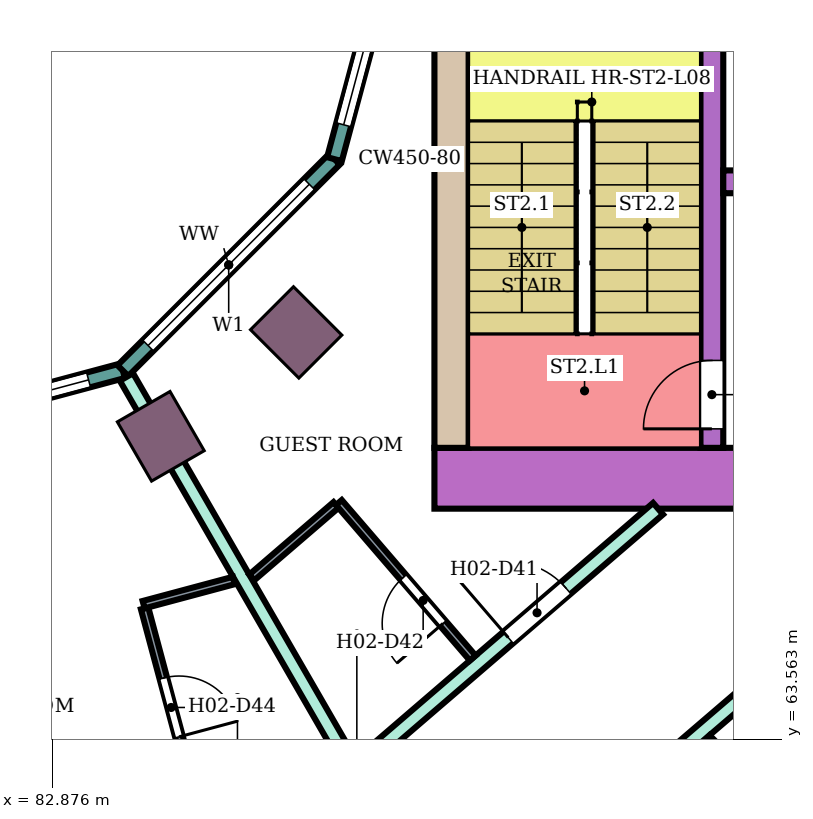
"""IFC4 building model, lengths in metres.
Left out: names, types, materials, properties, quantities, classifications, styles, units other than length and angle.
Written with IfcOpenShell. Run it as: python <this file> out.ifc"""

import sys

from ifc_helpers import new_model, si_unit, direction, frame, frame_2d, origin, origin_2d, place, context, subcontext, project, spatial, rectangle, extrude, element, fill, save


model = new_model("IFC4")
c1 = context("Model", 3, precision=1e-05, world=origin(), true_north=direction((0.0, 1.0)))
c2 = subcontext(c1, "Body", "Model", "MODEL_VIEW")
j1 = project(units=[si_unit("LENGTHUNIT", "METRE"), si_unit("PLANEANGLEUNIT", "RADIAN")], contexts=[c1])
p1 = place(None, origin())
s1 = spatial("IfcSite", under=j1, at=p1, CompositionType="ELEMENT")
p2 = place(p1, origin())
s2 = spatial("IfcBuilding", under=s1, at=p2, CompositionType="ELEMENT")
p3 = place(p2, frame((0.0, 0.0, 40.2)))
s3 = spatial("IfcBuildingStorey", under=s2, at=p3, CompositionType="ELEMENT", Elevation=40.2)
for number, where, z_axis, x_axis in (
    (1, (84.3, 67.552, 0.0), (0.0, 0.0, 1.0), (0.5, -0.866, 0.0)),
    (2, (86.081, 68.919, 0.0), (0.0, 0.0, 1.0), (0.707, -0.707, 0.0)),
):
    element("IfcColumn", number, at=place(p3, frame(where, z_axis=z_axis, x_axis=x_axis)), inside=s3, PredefinedType="COLUMN", context=c2, shape_type="SweptSolid", body=[
        extrude(rectangle(XDim=0.9, YDim=0.8, at=origin_2d()), origin(), (0.0, 0.0, 1.0), 3.8),
    ])
p4 = place(p3, frame((87.9, 67.0, 0.0), z_axis=(0.0, 0.0, 1.0), x_axis=(1.0, 0.0, 0.0)))
e3 = element("IfcWall", 3, at=p4, inside=s3, PredefinedType="SHEAR", context=c2, shape_type="SweptSolid", body=[
    extrude(rectangle(XDim=14.7, YDim=0.8, at=frame_2d((7.35, 0.0))), origin(), (0.0, 0.0, 1.0), 3.48),
])
p5 = place(p4, frame((4.2, 0.0, 0.0)))
e4 = element("IfcOpeningElement", 4, at=p5, cuts=e3, PredefinedType="OPENING", context=c2, shape_type="SweptSolid", body=[
    extrude(rectangle(XDim=2.4, YDim=2.4, at=frame_2d((1.2, 1.2))), frame((0.0, 0.41, 0.0), z_axis=(0.0, -1.0, 0.0), x_axis=(1.0, 0.0, 0.0)), (0.0, 0.0, 1.0), 0.82),
])
p6 = place(p3, frame((88.125, 67.4, 0.0), z_axis=(0.0, 0.0, 1.0), x_axis=(0.0, 1.0, 0.0)))
e5 = element("IfcWall", 5, at=p6, inside=s3, PredefinedType="SHEAR", context=c2, shape_type="SweptSolid", body=[
    extrude(rectangle(XDim=7.6, YDim=0.45, at=frame_2d((3.8, 0.0))), origin(), (0.0, 0.0, 1.0), 3.48),
])
p7 = place(p3, frame((91.55, 67.4, 0.0), z_axis=(0.0, 0.0, 1.0), x_axis=(0.0, 1.0, 0.0)))
e6 = element("IfcWall", 6, at=p7, inside=s3, PredefinedType="SHEAR", context=c2, shape_type="SweptSolid", body=[
    extrude(rectangle(XDim=7.6, YDim=0.3, at=frame_2d((3.8, 0.0))), origin(), (0.0, 0.0, 1.0), 3.48),
])
p8 = place(p7, frame((0.25, 0.0, 0.0)))
e7 = element("IfcOpeningElement", 7, at=p8, cuts=e6, PredefinedType="OPENING", context=c2, shape_type="SweptSolid", body=[
    extrude(rectangle(XDim=0.9, YDim=2.1, at=frame_2d((0.45, 1.05))), frame((0.0, 0.16, 0.0), z_axis=(0.0, -1.0, 0.0), x_axis=(1.0, 0.0, 0.0)), (0.0, 0.0, 1.0), 0.32),
])
p9 = place(p3, frame((91.7, 70.9, 0.0), z_axis=(0.0, 0.0, 1.0), x_axis=(1.0, 0.0, 0.0)))
e8 = element("IfcWall", 8, at=p9, inside=s3, PredefinedType="SHEAR", context=c2, shape_type="SweptSolid", body=[
    extrude(rectangle(XDim=10.9, YDim=0.3, at=frame_2d((5.45, 0.0))), origin(), (0.0, 0.0, 1.0), 3.48),
])
p10 = place(p9, frame((0.4, 0.0, 0.0)))
e9 = element("IfcOpeningElement", 9, at=p10, cuts=e8, PredefinedType="OPENING", context=c2, shape_type="SweptSolid", body=[
    extrude(rectangle(XDim=1.4, YDim=2.1, at=frame_2d((0.7, 1.05))), frame((0.0, 0.16, 0.0), z_axis=(0.0, -1.0, 0.0), x_axis=(1.0, 0.0, 0.0)), (0.0, 0.0, 1.0), 0.32),
])
p11 = place(p9, frame((5.4, 0.0, 0.0)))
e10 = element("IfcOpeningElement", 10, at=p11, cuts=e8, PredefinedType="OPENING", context=c2, shape_type="SweptSolid", body=[
    extrude(rectangle(XDim=1.4, YDim=2.1, at=frame_2d((0.7, 1.05))), frame((0.0, 0.16, 0.0), z_axis=(0.0, -1.0, 0.0), x_axis=(1.0, 0.0, 0.0)), (0.0, 0.0, 1.0), 0.32),
])
p12 = place(p9, frame((8.1, 0.0, 0.0)))
e11 = element("IfcOpeningElement", 11, at=p12, cuts=e8, PredefinedType="OPENING", context=c2, shape_type="SweptSolid", body=[
    extrude(rectangle(XDim=1.0, YDim=2.1, at=frame_2d((0.5, 1.05))), frame((0.0, 0.16, 0.0), z_axis=(0.0, -1.0, 0.0), x_axis=(1.0, 0.0, 0.0)), (0.0, 0.0, 1.0), 0.32),
])
p13 = place(p3, frame((80.0, 67.396, 0.0), z_axis=(0.0, 0.0, 1.0), x_axis=(0.965933654434, 0.258789828301, 0.0)))
e12 = element("IfcWall", 12, at=p13, inside=s3, PredefinedType="NOTDEFINED", context=c2, shape_type="SweptSolid", body=[
    extrude(rectangle(XDim=3.936, YDim=0.2, at=frame_2d((1.968, 0.0))), origin(), (0.0, 0.0, 1.0), 3.8),
])
p14 = place(p13, frame((0.468, 0.0, 0.9)))
e13 = element("IfcOpeningElement", 13, at=p14, cuts=e12, PredefinedType="OPENING", context=c2, shape_type="SweptSolid", body=[
    extrude(rectangle(XDim=3.0, YDim=2.3, at=frame_2d((1.5, 1.15))), frame((0.0, 0.11, 0.0), z_axis=(0.0, -1.0, 0.0), x_axis=(1.0, 0.0, 0.0)), (0.0, 0.0, 1.0), 0.22),
])
p15 = place(p3, frame((83.802, 68.415, 0.0), z_axis=(0.0, 0.0, 1.0), x_axis=(0.707106781187, 0.707106781187, 0.0)))
e14 = element("IfcWall", 14, at=p15, inside=s3, PredefinedType="NOTDEFINED", context=c2, shape_type="SweptSolid", body=[
    extrude(rectangle(XDim=3.936, YDim=0.2, at=frame_2d((1.968, 0.0))), origin(), (0.0, 0.0, 1.0), 3.8),
])
p16 = place(p15, frame((0.468, 0.0, 0.9)))
e15 = element("IfcOpeningElement", 15, at=p16, cuts=e14, PredefinedType="OPENING", context=c2, shape_type="SweptSolid", body=[
    extrude(rectangle(XDim=3.0, YDim=2.3, at=frame_2d((1.5, 1.15))), frame((0.0, 0.11, 0.0), z_axis=(0.0, -1.0, 0.0), x_axis=(1.0, 0.0, 0.0)), (0.0, 0.0, 1.0), 0.22),
])
p17 = place(p3, frame((86.585, 71.198, 0.0), z_axis=(0.0, 0.0, 1.0), x_axis=(0.258789828301, 0.965933654434, 0.0)))
e16 = element("IfcWall", 16, at=p17, inside=s3, PredefinedType="NOTDEFINED", context=c2, shape_type="SweptSolid", body=[
    extrude(rectangle(XDim=3.936, YDim=0.2, at=frame_2d((1.968, 0.0))), origin(), (0.0, 0.0, 1.0), 3.8),
])
p18 = place(p17, frame((0.468, 0.0, 0.9)))
e17 = element("IfcOpeningElement", 17, at=p18, cuts=e16, PredefinedType="OPENING", context=c2, shape_type="SweptSolid", body=[
    extrude(rectangle(XDim=3.0, YDim=2.3, at=frame_2d((1.5, 1.15))), frame((0.0, 0.11, 0.0), z_axis=(0.0, -1.0, 0.0), x_axis=(1.0, 0.0, 0.0)), (0.0, 0.0, 1.0), 0.22),
])
p19 = place(p3, frame((83.848, 68.332, 0.0), z_axis=(0.0, 0.0, 1.0), x_axis=(0.499919778085, -0.866071714975, 0.0)))
e18 = element("IfcWall", 18, at=p19, inside=s3, PredefinedType="PARTITIONING", context=c2, shape_type="SweptSolid", body=[
    extrude(rectangle(XDim=5.855, YDim=0.2, at=frame_2d((2.927, 0.0))), origin(), (0.0, 0.0, 1.0), 3.35),
])
p20 = place(p3, frame((86.877, 63.189, 0.0), z_axis=(0.0, 0.0, 1.0), x_axis=(0.758164888471, 0.652062881853, 0.0)))
e19 = element("IfcWall", 19, at=p20, inside=s3, PredefinedType="PARTITIONING", context=c2, shape_type="SweptSolid", body=[
    extrude(rectangle(XDim=5.23, YDim=0.2, at=frame_2d((2.615, 0.0))), origin(), (0.0, 0.0, 1.0), 3.35),
])
p21 = place(p20, frame((2.63, 0.0, 0.0)))
e20 = element("IfcOpeningElement", 20, at=p21, cuts=e19, PredefinedType="OPENING", context=c2, shape_type="SweptSolid", body=[
    extrude(rectangle(XDim=1.0, YDim=2.1, at=frame_2d((0.5, 1.05))), frame((0.0, 0.11, 0.0), z_axis=(0.0, -1.0, 0.0), x_axis=(1.0, 0.0, 0.0)), (0.0, 0.0, 1.0), 0.22),
])
p22 = place(p3, frame((88.235, 60.931, 0.0), z_axis=(0.0, 0.0, 1.0), x_axis=(0.758799498714, 0.651324282329, 0.0)))
e21 = element("IfcWall", 21, at=p22, inside=s3, PredefinedType="PARTITIONING", context=c2, shape_type="SweptSolid", body=[
    extrude(rectangle(XDim=6.186, YDim=0.2, at=frame_2d((3.093, 0.0))), origin(), (0.0, 0.0, 1.0), 3.35),
])
p23 = place(p22, frame((1.519, 0.0, 0.0)))
e22 = element("IfcOpeningElement", 22, at=p23, cuts=e21, PredefinedType="OPENING", context=c2, shape_type="SweptSolid", body=[
    extrude(rectangle(XDim=1.0, YDim=2.1, at=frame_2d((0.5, 1.05))), frame((0.0, 0.11, 0.0), z_axis=(0.0, -1.0, 0.0), x_axis=(1.0, 0.0, 0.0)), (0.0, 0.0, 1.0), 0.22),
])
p24 = place(p3, frame((91.449, 63.548, 0.0), z_axis=(0.0, 0.0, 1.0), x_axis=(0.706984810649, -0.707228730688, 0.0)))
e23 = element("IfcWall", 23, at=p24, inside=s3, PredefinedType="PARTITIONING", context=c2, shape_type="SweptSolid", body=[
    extrude(rectangle(XDim=7.006, YDim=0.2, at=frame_2d((3.503, 0.0))), origin(), (0.0, 0.0, 1.0), 3.35),
])
p25 = place(p3, frame((84.087, 65.289, 0.0), z_axis=(0.0, 0.0, 1.0), x_axis=(0.258929459649, -0.965896234037, 0.0)))
e24 = element("IfcWall", 24, at=p25, inside=s3, PredefinedType="PARTITIONING", context=c2, shape_type="SweptSolid", body=[
    extrude(rectangle(XDim=2.65, YDim=0.1, at=frame_2d((1.325, 0.0))), origin(), (0.0, 0.0, 1.0), 3.35),
])
p26 = place(p25, frame((0.95, 0.0, 0.0)))
e25 = element("IfcOpeningElement", 25, at=p26, cuts=e24, PredefinedType="OPENING", context=c2, shape_type="SweptSolid", body=[
    extrude(rectangle(XDim=0.8, YDim=2.1, at=frame_2d((0.4, 1.05))), frame((0.0, 0.06, 0.0), z_axis=(0.0, -1.0, 0.0), x_axis=(1.0, 0.0, 0.0)), (0.0, 0.0, 1.0), 0.12),
])
p27 = place(p3, frame((84.074, 65.337, 0.0), z_axis=(0.0, 0.0, 1.0), x_axis=(0.965914351064, 0.258861867428, 0.0)))
e26 = element("IfcWall", 26, at=p27, inside=s3, PredefinedType="PARTITIONING", context=c2, shape_type="SweptSolid", body=[
    extrude(rectangle(XDim=1.229, YDim=0.1, at=frame_2d((0.615, 0.0))), origin(), (0.0, 0.0, 1.0), 3.35),
])
p28 = place(p3, frame((85.497, 65.696, 0.0), z_axis=(0.0, 0.0, 1.0), x_axis=(0.75817032582, 0.652056559698, 0.0)))
e27 = element("IfcWall", 27, at=p28, inside=s3, PredefinedType="PARTITIONING", context=c2, shape_type="SweptSolid", body=[
    extrude(rectangle(XDim=1.461, YDim=0.1, at=frame_2d((0.73, 0.0))), origin(), (0.0, 0.0, 1.0), 3.35),
])
p29 = place(p3, frame((86.643, 66.681, 0.0), z_axis=(0.0, 0.0, 1.0), x_axis=(0.652264876065, -0.757991115682, 0.0)))
e28 = element("IfcWall", 28, at=p29, inside=s3, PredefinedType="PARTITIONING", context=c2, shape_type="SweptSolid", body=[
    extrude(rectangle(XDim=2.699, YDim=0.1, at=frame_2d((1.35, 0.0))), origin(), (0.0, 0.0, 1.0), 3.35),
])
p30 = place(p29, frame((1.3, 0.0, 0.0)))
e29 = element("IfcOpeningElement", 29, at=p30, cuts=e28, PredefinedType="OPENING", context=c2, shape_type="SweptSolid", body=[
    extrude(rectangle(XDim=0.8, YDim=2.1, at=frame_2d((0.4, 1.05))), frame((0.0, 0.06, 0.0), z_axis=(0.0, -1.0, 0.0), x_axis=(1.0, 0.0, 0.0)), (0.0, 0.0, 1.0), 0.12),
])
p31 = place(p14, origin())
e30 = element("IfcWindow", 30, at=p31, inside=s3, PartitioningType="SINGLE_PANEL", PredefinedType="WINDOW", context=c2, shape_type="SweptSolid", body=[
    extrude(rectangle(XDim=3.0, YDim=2.3, at=frame_2d((1.5, 1.15))), frame((0.0, 0.03, 0.0), z_axis=(0.0, -1.0, 0.0), x_axis=(1.0, 0.0, 0.0)), (0.0, 0.0, 1.0), 0.06),
])
fill(e13, e30)
p32 = place(p16, origin())
e31 = element("IfcWindow", 31, at=p32, inside=s3, PartitioningType="SINGLE_PANEL", PredefinedType="WINDOW", context=c2, shape_type="SweptSolid", body=[
    extrude(rectangle(XDim=3.0, YDim=2.3, at=frame_2d((1.5, 1.15))), frame((0.0, 0.03, 0.0), z_axis=(0.0, -1.0, 0.0), x_axis=(1.0, 0.0, 0.0)), (0.0, 0.0, 1.0), 0.06),
])
fill(e15, e31)
p33 = place(p18, origin())
e32 = element("IfcWindow", 32, at=p33, inside=s3, PartitioningType="SINGLE_PANEL", PredefinedType="WINDOW", context=c2, shape_type="SweptSolid", body=[
    extrude(rectangle(XDim=3.0, YDim=2.3, at=frame_2d((1.5, 1.15))), frame((0.0, 0.03, 0.0), z_axis=(0.0, -1.0, 0.0), x_axis=(1.0, 0.0, 0.0)), (0.0, 0.0, 1.0), 0.06),
])
fill(e17, e32)
p34 = place(p21, origin())
e33 = element("IfcDoor", 33, at=p34, inside=s3, OperationType="SINGLE_SWING_LEFT", PredefinedType="DOOR", context=c2, shape_type="SweptSolid", body=[
    extrude(rectangle(XDim=1.0, YDim=2.1, at=frame_2d((0.5, 1.05))), frame((0.0, 0.025, 0.0), z_axis=(0.0, -1.0, 0.0), x_axis=(1.0, 0.0, 0.0)), (0.0, 0.0, 1.0), 0.05),
])
fill(e20, e33)
p35 = place(p30, frame((0.8, 0.0, 0.0), z_axis=(0.0, 0.0, 1.0), x_axis=(-1.0, 0.0, 0.0)))
e34 = element("IfcDoor", 34, at=p35, inside=s3, OperationType="SINGLE_SWING_LEFT", PredefinedType="DOOR", context=c2, shape_type="SweptSolid", body=[
    extrude(rectangle(XDim=0.8, YDim=2.1, at=frame_2d((0.4, 1.05))), frame((0.0, 0.025, 0.0), z_axis=(0.0, -1.0, 0.0), x_axis=(1.0, 0.0, 0.0)), (0.0, 0.0, 1.0), 0.05),
])
fill(e29, e34)
p36 = place(p26, origin())
e35 = element("IfcDoor", 35, at=p36, inside=s3, OperationType="SINGLE_SWING_RIGHT", PredefinedType="DOOR", context=c2, shape_type="SweptSolid", body=[
    extrude(rectangle(XDim=0.8, YDim=2.1, at=frame_2d((0.4, 1.05))), frame((0.0, 0.025, 0.0), z_axis=(0.0, -1.0, 0.0), x_axis=(1.0, 0.0, 0.0)), (0.0, 0.0, 1.0), 0.05),
])
fill(e25, e35)
p37 = place(p8, origin())
e36 = element("IfcDoor", 36, at=p37, inside=s3, OperationType="SINGLE_SWING_LEFT", PredefinedType="DOOR", context=c2, shape_type="SweptSolid", body=[
    extrude(rectangle(XDim=0.9, YDim=2.1, at=frame_2d((0.45, 1.05))), frame((0.0, 0.025, 0.0), z_axis=(0.0, -1.0, 0.0), x_axis=(1.0, 0.0, 0.0)), (0.0, 0.0, 1.0), 0.05),
])
fill(e7, e36)
save(model, sys.argv[1])
